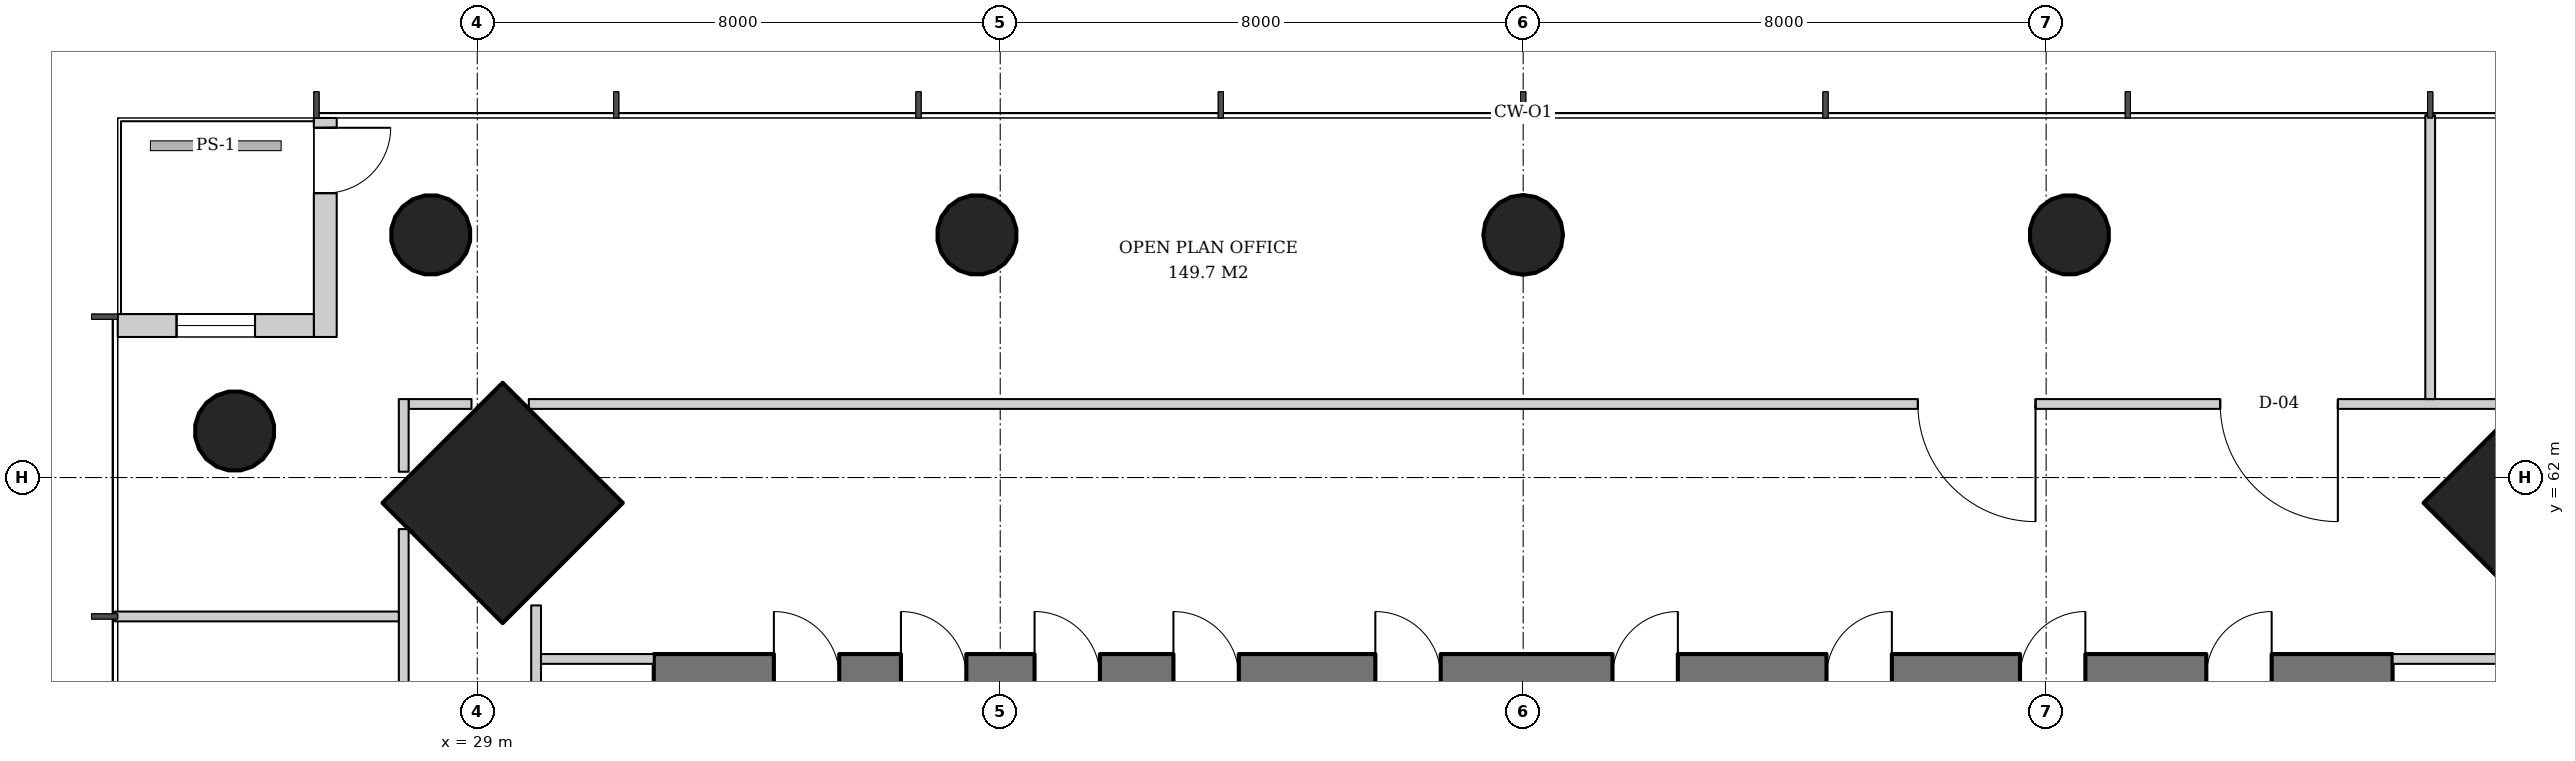
"""IFC4 building model, lengths in metres.
Left out: names, types, materials, properties, quantities, classifications, styles, units other than length and angle.
Written with IfcOpenShell. Run it as: python <this file> out.ifc"""

import sys

from ifc_helpers import new_model, si_unit, direction, frame, frame_2d, origin, origin_2d, place, context, subcontext, project, spatial, rectangle, hollow_circle, extrude, element, fill, save


model = new_model("IFC4")
c1 = context("Model", 3, precision=1e-05, world=origin(), true_north=direction((0.0, 1.0)))
c2 = subcontext(c1, "Body", "Model", "MODEL_VIEW")
j1 = project(units=[si_unit("LENGTHUNIT", "METRE"), si_unit("PLANEANGLEUNIT", "RADIAN")], contexts=[c1])
p1 = place(None, origin())
s1 = spatial("IfcSite", under=j1, at=p1, CompositionType="ELEMENT")
p2 = place(p1, origin())
s2 = spatial("IfcBuilding", under=s1, at=p2, CompositionType="ELEMENT")
p3 = place(p2, frame((0.0, 0.0, 154.0)))
s3 = spatial("IfcBuildingStorey", under=s2, at=p3, CompositionType="ELEMENT", Elevation=154.0)
for number, where, z_axis, x_axis in (
    (1, (60.65, 61.65, 0.0), (-0.032, -0.032, 0.999), (0.707, -0.707, 0.0)),
    (2, (29.35, 61.65, 0.0), (0.032, -0.032, 0.999), (0.707, 0.707, 0.0)),
):
    element("IfcColumn", number, at=place(p3, frame(where, z_axis=z_axis, x_axis=x_axis)), inside=s3, PredefinedType="COLUMN", context=c2, shape_type="SweptSolid", body=[
        extrude(rectangle(XDim=2.6, YDim=2.6, at=origin_2d()), origin(), (0.0, 0.0, 1.0), 3.804),
    ])
p4 = place(p3, frame((28.25, 65.75, 0.0), z_axis=(0.031898107953, -0.031898107953, 0.998981992539), x_axis=(0.707106781187, 0.707106781187, 0.0)))
e3 = element("IfcColumn", 3, at=p4, inside=s3, PredefinedType="COLUMN", context=c2, shape_type="SweptSolid", body=[
    extrude(hollow_circle(Radius=0.61, WallThickness=0.04, at=origin_2d()), origin(), (0.0, 0.0, 1.0), 3.804),
])
p5 = place(p3, frame((53.375, 65.75, 0.0), z_axis=(-0.015987237665, -0.031910269556, 0.999362868496), x_axis=(0.894067115991, -0.447933021895, 0.0)))
e4 = element("IfcColumn", 4, at=p5, inside=s3, PredefinedType="COLUMN", context=c2, shape_type="SweptSolid", body=[
    extrude(hollow_circle(Radius=0.61, WallThickness=0.04, at=origin_2d()), origin(), (0.0, 0.0, 1.0), 3.802),
])
p6 = place(p3, frame((45.0, 65.75, 0.0), z_axis=(0.0, -0.031914348339, 0.999490607445), x_axis=(1.0, 0.0, 0.0)))
e5 = element("IfcColumn", 5, at=p6, inside=s3, PredefinedType="COLUMN", context=c2, shape_type="SweptSolid", body=[
    extrude(hollow_circle(Radius=0.61, WallThickness=0.04, at=origin_2d()), origin(), (0.0, 0.0, 1.0), 3.802),
])
p7 = place(p3, frame((36.625, 65.75, 0.0), z_axis=(0.015987237665, -0.031910269556, 0.999362868496), x_axis=(0.894067115991, 0.447933021895, 0.0)))
e6 = element("IfcColumn", 6, at=p7, inside=s3, PredefinedType="COLUMN", context=c2, shape_type="SweptSolid", body=[
    extrude(hollow_circle(Radius=0.61, WallThickness=0.04, at=origin_2d()), origin(), (0.0, 0.0, 1.0), 3.802),
])
p8 = place(p3, frame((25.25, 62.75, 0.0), z_axis=(0.031898107953, -0.031898107953, 0.998981992539), x_axis=(0.707106781187, 0.707106781187, 0.0)))
e7 = element("IfcColumn", 7, at=p8, inside=s3, PredefinedType="COLUMN", context=c2, shape_type="SweptSolid", body=[
    extrude(hollow_circle(Radius=0.61, WallThickness=0.04, at=origin_2d()), origin(), (0.0, 0.0, 1.0), 3.804),
])
p9 = place(p3, frame((31.7, 58.95, 0.0), z_axis=(0.0, 0.0, 1.0), x_axis=(1.0, 0.0, 0.0)))
e8 = element("IfcWall", 8, at=p9, inside=s3, PredefinedType="SHEAR", context=c2, shape_type="SweptSolid", body=[
    extrude(rectangle(XDim=26.6, YDim=0.7, at=frame_2d((13.3, 0.0))), origin(), (0.0, 0.0, 1.0), 3.8),
])
p10 = place(p9, frame((17.94, 0.0, 0.0)))
e9 = element("IfcOpeningElement", 9, at=p10, cuts=e8, PredefinedType="OPENING", context=c2, shape_type="SweptSolid", body=[
    extrude(rectangle(XDim=1.0, YDim=2.1, at=frame_2d((0.5, 1.05))), frame((0.0, 0.36, 0.0), z_axis=(0.0, -1.0, 0.0), x_axis=(1.0, 0.0, 0.0)), (0.0, 0.0, 1.0), 0.72),
])
p11 = place(p9, frame((5.825, 0.0, 0.0)))
e10 = element("IfcOpeningElement", 10, at=p11, cuts=e8, PredefinedType="OPENING", context=c2, shape_type="SweptSolid", body=[
    extrude(rectangle(XDim=1.0, YDim=2.1, at=frame_2d((0.5, 1.05))), frame((0.0, 0.36, 0.0), z_axis=(0.0, -1.0, 0.0), x_axis=(1.0, 0.0, 0.0)), (0.0, 0.0, 1.0), 0.72),
])
p12 = place(p9, frame((1.837, 0.0, 0.0)))
e11 = element("IfcOpeningElement", 11, at=p12, cuts=e8, PredefinedType="OPENING", context=c2, shape_type="SweptSolid", body=[
    extrude(rectangle(XDim=1.0, YDim=2.1, at=frame_2d((0.5, 1.05))), frame((0.0, 0.36, 0.0), z_axis=(0.0, -1.0, 0.0), x_axis=(1.0, 0.0, 0.0)), (0.0, 0.0, 1.0), 0.72),
])
p13 = place(p9, frame((3.781, 0.0, 0.0)))
e12 = element("IfcOpeningElement", 12, at=p13, cuts=e8, PredefinedType="OPENING", context=c2, shape_type="SweptSolid", body=[
    extrude(rectangle(XDim=1.0, YDim=2.1, at=frame_2d((0.5, 1.05))), frame((0.0, 0.36, 0.0), z_axis=(0.0, -1.0, 0.0), x_axis=(1.0, 0.0, 0.0)), (0.0, 0.0, 1.0), 0.72),
])
p14 = place(p9, frame((7.95, 0.0, 0.0)))
e13 = element("IfcOpeningElement", 13, at=p14, cuts=e8, PredefinedType="OPENING", context=c2, shape_type="SweptSolid", body=[
    extrude(rectangle(XDim=1.0, YDim=2.1, at=frame_2d((0.5, 1.05))), frame((0.0, 0.36, 0.0), z_axis=(0.0, -1.0, 0.0), x_axis=(1.0, 0.0, 0.0)), (0.0, 0.0, 1.0), 0.72),
])
p15 = place(p9, frame((11.038, 0.0, 0.0)))
e14 = element("IfcOpeningElement", 14, at=p15, cuts=e8, PredefinedType="OPENING", context=c2, shape_type="SweptSolid", body=[
    extrude(rectangle(XDim=1.0, YDim=2.1, at=frame_2d((0.5, 1.05))), frame((0.0, 0.36, 0.0), z_axis=(0.0, -1.0, 0.0), x_axis=(1.0, 0.0, 0.0)), (0.0, 0.0, 1.0), 0.72),
])
p16 = place(p9, frame((14.666, 0.0, 0.0)))
e15 = element("IfcOpeningElement", 15, at=p16, cuts=e8, PredefinedType="OPENING", context=c2, shape_type="SweptSolid", body=[
    extrude(rectangle(XDim=1.0, YDim=2.1, at=frame_2d((0.5, 1.05))), frame((0.0, 0.36, 0.0), z_axis=(0.0, -1.0, 0.0), x_axis=(1.0, 0.0, 0.0)), (0.0, 0.0, 1.0), 0.72),
])
p17 = place(p9, frame((20.9, 0.0, 0.0)))
e16 = element("IfcOpeningElement", 16, at=p17, cuts=e8, PredefinedType="OPENING", context=c2, shape_type="SweptSolid", body=[
    extrude(rectangle(XDim=1.0, YDim=2.1, at=frame_2d((0.5, 1.05))), frame((0.0, 0.36, 0.0), z_axis=(0.0, -1.0, 0.0), x_axis=(1.0, 0.0, 0.0)), (0.0, 0.0, 1.0), 0.72),
])
p18 = place(p9, frame((23.75, 0.0, 0.0)))
e17 = element("IfcOpeningElement", 17, at=p18, cuts=e8, PredefinedType="OPENING", context=c2, shape_type="SweptSolid", body=[
    extrude(rectangle(XDim=1.0, YDim=2.1, at=frame_2d((0.5, 1.05))), frame((0.0, 0.36, 0.0), z_axis=(0.0, -1.0, 0.0), x_axis=(1.0, 0.0, 0.0)), (0.0, 0.0, 1.0), 0.72),
])
p19 = place(p3, frame((26.675, 67.5, 0.0), z_axis=(0.0, 0.0, 1.0), x_axis=(0.0, -1.0, 0.0)))
e18 = element("IfcWall", 18, at=p19, inside=s3, PredefinedType="SOLIDWALL", context=c2, shape_type="SweptSolid", body=[
    extrude(rectangle(XDim=3.35, YDim=0.35, at=frame_2d((1.675, 0.0))), origin(), (0.0, 0.0, 1.0), 3.52),
])
p20 = place(p19, frame((0.15, 0.0, 0.0)))
e19 = element("IfcOpeningElement", 19, at=p20, cuts=e18, PredefinedType="OPENING", context=c2, shape_type="SweptSolid", body=[
    extrude(rectangle(XDim=1.0, YDim=2.4, at=frame_2d((0.5, 1.2))), frame((0.0, 0.185, 0.0), z_axis=(0.0, -1.0, 0.0), x_axis=(1.0, 0.0, 0.0)), (0.0, 0.0, 1.0), 0.37),
])
p21 = place(p3, frame((26.5, 64.325, 0.0), z_axis=(0.0, 0.0, 1.0), x_axis=(-1.0, 0.0, 0.0)))
e20 = element("IfcWall", 20, at=p21, inside=s3, PredefinedType="SOLIDWALL", context=c2, shape_type="SweptSolid", body=[
    extrude(rectangle(XDim=3.0, YDim=0.35, at=frame_2d((1.5, 0.0))), origin(), (0.0, 0.0, 1.0), 3.52),
])
p22 = place(p21, frame((0.9, 0.0, 0.6)))
e21 = element("IfcOpeningElement", 21, at=p22, cuts=e20, PredefinedType="OPENING", context=c2, shape_type="SweptSolid", body=[
    extrude(rectangle(XDim=1.2, YDim=2.55, at=frame_2d((0.6, 1.275))), frame((0.0, 0.185, 0.0), z_axis=(0.0, -1.0, 0.0), x_axis=(1.0, 0.0, 0.0)), (0.0, 0.0, 1.0), 0.37),
])
p23 = place(p3, frame((58.3, 59.225, 0.0), z_axis=(0.0, 0.0, 1.0), x_axis=(1.0, 0.0, 0.0)))
e22 = element("IfcWall", 22, at=p23, inside=s3, PredefinedType="PARTITIONING", context=c2, shape_type="SweptSolid", body=[
    extrude(rectangle(XDim=1.725, YDim=0.15, at=frame_2d((0.862, 0.0))), origin(), (0.0, 0.0, 1.0), 3.52),
])
p24 = place(p3, frame((29.9, 60.044, 0.0), z_axis=(0.0, 0.0, 1.0), x_axis=(0.0, -1.0, 0.0)))
e23 = element("IfcWall", 23, at=p24, inside=s3, PredefinedType="PARTITIONING", context=c2, shape_type="SweptSolid", body=[
    extrude(rectangle(XDim=6.669, YDim=0.15, at=frame_2d((3.334, 0.0))), origin(), (0.0, 0.0, 1.0), 2.706),
])
p25 = place(p24, frame((3.206, 0.0, 0.0)))
e24 = element("IfcOpeningElement", 24, at=p25, cuts=e23, PredefinedType="OPENING", context=c2, shape_type="SweptSolid", body=[
    extrude(rectangle(XDim=1.0, YDim=2.1, at=frame_2d((0.5, 1.05))), frame((0.0, 0.085, 0.0), z_axis=(0.0, -1.0, 0.0), x_axis=(1.0, 0.0, 0.0)), (0.0, 0.0, 1.0), 0.17),
])
p26 = place(p3, frame((31.7, 59.225, 0.0), z_axis=(0.0, 0.0, 1.0), x_axis=(-1.0, 0.0, 0.0)))
e25 = element("IfcWall", 25, at=p26, inside=s3, PredefinedType="PARTITIONING", context=c2, shape_type="SweptSolid", body=[
    extrude(rectangle(XDim=1.725, YDim=0.15, at=frame_2d((0.862, 0.0))), origin(), (0.0, 0.0, 1.0), 3.52),
])
p27 = place(p3, frame((60.211, 63.125, 0.0), z_axis=(0.0, 0.0, 1.0), x_axis=(-1.0, 0.0, 0.0)))
e26 = element("IfcWall", 26, at=p27, inside=s3, PredefinedType="PARTITIONING", context=c2, shape_type="SweptSolid", body=[
    extrude(rectangle(XDim=30.423, YDim=0.15, at=frame_2d((15.211, 0.0))), origin(), (0.0, 0.0, 1.0), 2.706),
])
p28 = place(p27, frame((2.749, 0.0, 0.0)))
e27 = element("IfcOpeningElement", 27, at=p28, cuts=e26, PredefinedType="OPENING", context=c2, shape_type="SweptSolid", body=[
    extrude(rectangle(XDim=1.8, YDim=2.4, at=frame_2d((0.9, 1.2))), frame((0.0, 0.085, 0.0), z_axis=(0.0, -1.0, 0.0), x_axis=(1.0, 0.0, 0.0)), (0.0, 0.0, 1.0), 0.17),
])
p29 = place(p27, frame((7.374, 0.0, 0.0)))
e28 = element("IfcOpeningElement", 28, at=p29, cuts=e26, PredefinedType="OPENING", context=c2, shape_type="SweptSolid", body=[
    extrude(rectangle(XDim=1.8, YDim=2.4, at=frame_2d((0.9, 1.2))), frame((0.0, 0.085, 0.0), z_axis=(0.0, -1.0, 0.0), x_axis=(1.0, 0.0, 0.0)), (0.0, 0.0, 1.0), 0.17),
])
p30 = place(p3, frame((28.912, 63.125, 0.0), z_axis=(0.0, 0.0, 1.0), x_axis=(-1.0, 0.0, 0.0)))
e29 = element("IfcWall", 29, at=p30, inside=s3, PredefinedType="PARTITIONING", context=c2, shape_type="SweptSolid", body=[
    extrude(rectangle(XDim=0.962, YDim=0.15, at=frame_2d((0.481, 0.0))), origin(), (0.0, 0.0, 1.0), 2.92),
])
p31 = place(p3, frame((58.875, 63.2, 0.0), z_axis=(0.0, 0.0, 1.0), x_axis=(0.0, 1.0, 0.0)))
e30 = element("IfcWall", 30, at=p31, inside=s3, PredefinedType="PARTITIONING", context=c2, shape_type="SweptSolid", body=[
    extrude(rectangle(XDim=4.34, YDim=0.15, at=frame_2d((2.17, 0.0))), origin(), (0.0, 0.0, 1.0), 3.12),
])
p32 = place(p3, frame((27.875, 63.2, 0.0), z_axis=(0.0, 0.0, 1.0), x_axis=(0.0, -1.0, 0.0)))
e31 = element("IfcWall", 31, at=p32, inside=s3, PredefinedType="PARTITIONING", context=c2, shape_type="SweptSolid", body=[
    extrude(rectangle(XDim=1.112, YDim=0.15, at=frame_2d((0.556, 0.0))), origin(), (0.0, 0.0, 1.0), 2.92),
])
p33 = place(p3, frame((27.875, 61.211, 0.0), z_axis=(0.0, 0.0, 1.0), x_axis=(0.0, -1.0, 0.0)))
e32 = element("IfcWall", 32, at=p33, inside=s3, PredefinedType="PARTITIONING", context=c2, shape_type="SweptSolid", body=[
    extrude(rectangle(XDim=30.423, YDim=0.15, at=frame_2d((15.211, 0.0))), origin(), (0.0, 0.0, 1.0), 2.706),
])
p34 = place(p33, frame((3.149, 0.0, 0.0)))
e33 = element("IfcOpeningElement", 33, at=p34, cuts=e32, PredefinedType="OPENING", context=c2, shape_type="SweptSolid", body=[
    extrude(rectangle(XDim=1.0, YDim=2.1, at=frame_2d((0.5, 1.05))), frame((0.0, 0.085, 0.0), z_axis=(0.0, -1.0, 0.0), x_axis=(1.0, 0.0, 0.0)), (0.0, 0.0, 1.0), 0.17),
])
p35 = place(p33, frame((7.774, 0.0, 0.0)))
e34 = element("IfcOpeningElement", 34, at=p35, cuts=e32, PredefinedType="OPENING", context=c2, shape_type="SweptSolid", body=[
    extrude(rectangle(XDim=1.0, YDim=2.1, at=frame_2d((0.5, 1.05))), frame((0.0, 0.085, 0.0), z_axis=(0.0, -1.0, 0.0), x_axis=(1.0, 0.0, 0.0)), (0.0, 0.0, 1.0), 0.17),
])
p36 = place(p33, frame((12.399, 0.0, 0.0)))
e35 = element("IfcOpeningElement", 35, at=p36, cuts=e32, PredefinedType="OPENING", context=c2, shape_type="SweptSolid", body=[
    extrude(rectangle(XDim=1.0, YDim=2.1, at=frame_2d((0.5, 1.05))), frame((0.0, 0.085, 0.0), z_axis=(0.0, -1.0, 0.0), x_axis=(1.0, 0.0, 0.0)), (0.0, 0.0, 1.0), 0.17),
])
p37 = place(p33, frame((17.124, 0.0, 0.0)))
e36 = element("IfcOpeningElement", 36, at=p37, cuts=e32, PredefinedType="OPENING", context=c2, shape_type="SweptSolid", body=[
    extrude(rectangle(XDim=0.8, YDim=2.1, at=frame_2d((0.4, 1.05))), frame((0.0, 0.085, 0.0), z_axis=(0.0, -1.0, 0.0), x_axis=(1.0, 0.0, 0.0)), (0.0, 0.0, 1.0), 0.17),
])
p38 = place(p33, frame((21.649, 0.0, 0.0)))
e37 = element("IfcOpeningElement", 37, at=p38, cuts=e32, PredefinedType="OPENING", context=c2, shape_type="SweptSolid", body=[
    extrude(rectangle(XDim=1.0, YDim=2.1, at=frame_2d((0.5, 1.05))), frame((0.0, 0.085, 0.0), z_axis=(0.0, -1.0, 0.0), x_axis=(1.0, 0.0, 0.0)), (0.0, 0.0, 1.0), 0.17),
])
p39 = place(p33, frame((26.374, 0.0, 0.0)))
e38 = element("IfcOpeningElement", 38, at=p39, cuts=e32, PredefinedType="OPENING", context=c2, shape_type="SweptSolid", body=[
    extrude(rectangle(XDim=0.8, YDim=2.1, at=frame_2d((0.4, 1.05))), frame((0.0, 0.085, 0.0), z_axis=(0.0, -1.0, 0.0), x_axis=(1.0, 0.0, 0.0)), (0.0, 0.0, 1.0), 0.17),
])
p40 = place(p3, frame((27.8, 59.875, 0.0), z_axis=(0.0, 0.0, 1.0), x_axis=(-1.0, 0.0, 0.0)))
e39 = element("IfcWall", 39, at=p40, inside=s3, PredefinedType="PARTITIONING", context=c2, shape_type="SweptSolid", body=[
    extrude(rectangle(XDim=4.34, YDim=0.15, at=frame_2d((2.17, 0.0))), origin(), (0.0, 0.0, 1.0), 3.12),
])
p41 = place(p20, origin())
e40 = element("IfcDoor", 40, at=p41, inside=s3, OperationType="SINGLE_SWING_LEFT", PredefinedType="DOOR", context=c2, shape_type="SweptSolid", body=[
    extrude(rectangle(XDim=1.0, YDim=2.4, at=frame_2d((0.5, 1.2))), frame((0.0, 0.025, 0.0), z_axis=(0.0, -1.0, 0.0), x_axis=(1.0, 0.0, 0.0)), (0.0, 0.0, 1.0), 0.05),
])
fill(e19, e40)
p42 = place(p22, origin())
e41 = element("IfcWindow", 41, at=p42, inside=s3, PartitioningType="SINGLE_PANEL", PredefinedType="WINDOW", context=c2, shape_type="SweptSolid", body=[
    extrude(rectangle(XDim=1.2, YDim=2.55, at=frame_2d((0.6, 1.275))), frame((0.0, 0.03, 0.0), z_axis=(0.0, -1.0, 0.0), x_axis=(1.0, 0.0, 0.0)), (0.0, 0.0, 1.0), 0.06),
])
fill(e21, e41)
p43 = place(p10, origin())
e42 = element("IfcDoor", 42, at=p43, inside=s3, OperationType="SINGLE_SWING_RIGHT", PredefinedType="DOOR", context=c2, shape_type="SweptSolid", body=[
    extrude(rectangle(XDim=1.0, YDim=2.1, at=frame_2d((0.5, 1.05))), frame((0.0, 0.025, 0.0), z_axis=(0.0, -1.0, 0.0), x_axis=(1.0, 0.0, 0.0)), (0.0, 0.0, 1.0), 0.05),
])
fill(e9, e42)
p44 = place(p11, origin())
e43 = element("IfcDoor", 43, at=p44, inside=s3, OperationType="SINGLE_SWING_LEFT", PredefinedType="DOOR", context=c2, shape_type="SweptSolid", body=[
    extrude(rectangle(XDim=1.0, YDim=2.1, at=frame_2d((0.5, 1.05))), frame((0.0, 0.025, 0.0), z_axis=(0.0, -1.0, 0.0), x_axis=(1.0, 0.0, 0.0)), (0.0, 0.0, 1.0), 0.05),
])
fill(e10, e43)
p45 = place(p28, origin())
e44 = element("IfcDoor", 44, at=p45, inside=s3, OperationType="DOUBLE_DOOR_SINGLE_SWING", PredefinedType="DOOR", context=c2, shape_type="SweptSolid", body=[
    extrude(rectangle(XDim=1.8, YDim=2.4, at=frame_2d((0.9, 1.2))), frame((0.0, 0.025, 0.0), z_axis=(0.0, -1.0, 0.0), x_axis=(1.0, 0.0, 0.0)), (0.0, 0.0, 1.0), 0.05),
])
fill(e27, e44)
p46 = place(p29, origin())
e45 = element("IfcDoor", 45, at=p46, inside=s3, OperationType="DOUBLE_DOOR_SINGLE_SWING", PredefinedType="DOOR", context=c2, shape_type="SweptSolid", body=[
    extrude(rectangle(XDim=1.8, YDim=2.4, at=frame_2d((0.9, 1.2))), frame((0.0, 0.025, 0.0), z_axis=(0.0, -1.0, 0.0), x_axis=(1.0, 0.0, 0.0)), (0.0, 0.0, 1.0), 0.05),
])
fill(e28, e45)
save(model, sys.argv[1])
